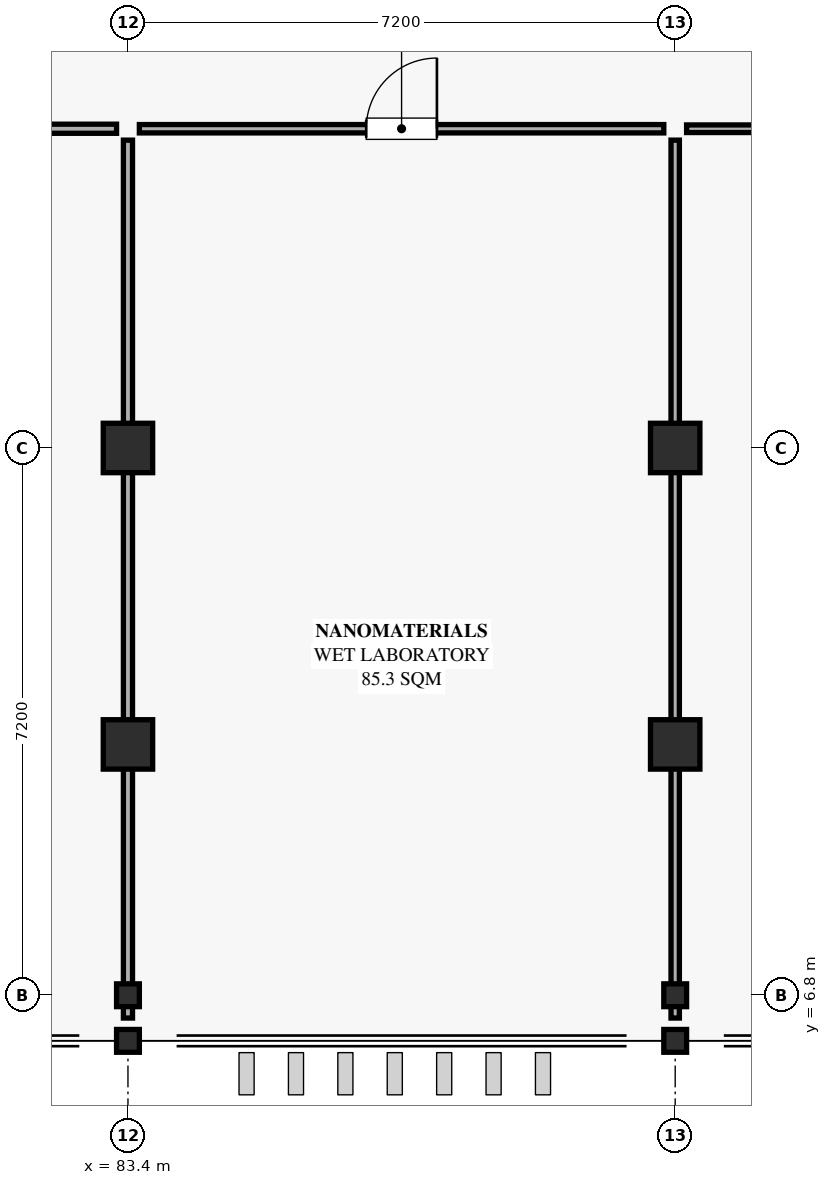
"""IFC4 building model, lengths in metres.
Left out: names, types, materials, properties, quantities, classifications, styles, units other than length and angle.
Written with IfcOpenShell. Run it as: python <this file> out.ifc"""

import sys

from ifc_helpers import new_model, si_unit, direction, frame, frame_2d, origin, origin_2d, place, context, subcontext, project, spatial, rectangle, hollow_rectangle, extrude, element, fill, save


model = new_model("IFC4")
c1 = context("Model", 3, precision=1e-05, world=origin(), true_north=direction((0.0, 1.0)))
c2 = subcontext(c1, "Body", "Model", "MODEL_VIEW")
j1 = project(units=[si_unit("LENGTHUNIT", "METRE"), si_unit("PLANEANGLEUNIT", "RADIAN")], contexts=[c1])
p1 = place(None, origin())
s1 = spatial("IfcSite", under=j1, at=p1, CompositionType="ELEMENT")
p2 = place(p1, origin())
s2 = spatial("IfcBuilding", under=s1, at=p2, CompositionType="ELEMENT")
p3 = place(p2, frame((0.0, 0.0, 33.3)))
s3 = spatial("IfcBuildingStorey", under=s2, at=p3, CompositionType="ELEMENT", Elevation=33.3)
for number, where, z_axis, x_axis in (
    (1, (83.4, 6.2, 0.0), (0.0, 0.0, 1.0), (1.0, 0.0, 0.0)),
    (2, (90.6, 6.2, 0.0), (0.0, 0.0, 1.0), (1.0, 0.0, 0.0)),
    (3, (83.4, 6.8, 0.0), (0.0, 0.0, 1.0), (1.0, 0.0, 0.0)),
    (4, (90.6, 6.8, 0.0), (0.0, 0.0, 1.0), (1.0, 0.0, 0.0)),
):
    element("IfcColumn", number, at=place(p3, frame(where, z_axis=z_axis, x_axis=x_axis)), inside=s3, PredefinedType="COLUMN", context=c2, shape_type="SweptSolid", body=[
        extrude(hollow_rectangle(XDim=0.3, YDim=0.3, WallThickness=0.012, InnerFilletRadius=0.018, OuterFilletRadius=0.03, at=origin_2d()), origin(), (0.0, 0.0, 1.0), 4.32),
    ])
for number, where, z_axis, x_axis in (
    (5, (83.4, 10.1, 0.0), (0.0, 0.0, 1.0), (1.0, 0.0, 0.0)),
    (6, (90.6, 10.1, 0.0), (0.0, 0.0, 1.0), (1.0, 0.0, 0.0)),
    (7, (83.4, 14.0, 0.0), (0.0, 0.0, 1.0), (1.0, 0.0, 0.0)),
    (8, (90.6, 14.0, 0.0), (0.0, 0.0, 1.0), (1.0, 0.0, 0.0)),
):
    element("IfcColumn", number, at=place(p3, frame(where, z_axis=z_axis, x_axis=x_axis)), inside=s3, PredefinedType="COLUMN", context=c2, shape_type="SweptSolid", body=[
        extrude(rectangle(XDim=0.65, YDim=0.65, at=origin_2d()), origin(), (0.0, 0.0, 1.0), 4.32),
    ])
p4 = place(p3, frame((54.95, 18.2, 0.0), z_axis=(0.0, 0.0, 1.0), x_axis=(1.0, 0.0, 0.0)))
e9 = element("IfcWall", 9, at=p4, inside=s3, PredefinedType="PARTITIONING", context=c2, shape_type="SweptSolid", body=[
    extrude(rectangle(XDim=28.3, YDim=0.12, at=frame_2d((14.15, 0.0))), origin(), (0.0, 0.0, 1.0), 2.8),
])
p5 = place(p4, frame((2.8, 0.0, 0.0)))
e10 = element("IfcOpeningElement", 10, at=p5, cuts=e9, PredefinedType="OPENING", context=c2, shape_type="SweptSolid", body=[
    extrude(rectangle(XDim=0.9, YDim=2.22, at=frame_2d((0.45, 1.11))), frame((0.0, 0.07, 0.0), z_axis=(0.0, -1.0, 0.0), x_axis=(1.0, 0.0, 0.0)), (0.0, 0.0, 1.0), 0.14),
])
p6 = place(p3, frame((83.4, 18.05, 0.0), z_axis=(0.0, 0.0, 1.0), x_axis=(0.0, -1.0, 0.0)))
e11 = element("IfcWall", 11, at=p6, inside=s3, PredefinedType="PARTITIONING", context=c2, shape_type="SweptSolid", body=[
    extrude(rectangle(XDim=11.55, YDim=0.12, at=frame_2d((5.775, 0.0))), origin(), (0.0, 0.0, 1.0), 2.8),
])
p7 = place(p3, frame((83.55, 18.2, 0.0), z_axis=(0.0, 0.0, 1.0), x_axis=(1.0, 0.0, 0.0)))
e12 = element("IfcWall", 12, at=p7, inside=s3, PredefinedType="PARTITIONING", context=c2, shape_type="SweptSolid", body=[
    extrude(rectangle(XDim=6.9, YDim=0.11, at=frame_2d((3.45, 0.0))), origin(), (0.0, 0.0, 1.0), 2.8),
])
p8 = place(p7, frame((2.985, 0.0, 0.0)))
e13 = element("IfcOpeningElement", 13, at=p8, cuts=e12, PredefinedType="OPENING", context=c2, shape_type="SweptSolid", body=[
    extrude(rectangle(XDim=0.93, YDim=2.05, at=frame_2d((0.465, 1.025))), frame((0.0, 0.065, 0.0), z_axis=(0.0, -1.0, 0.0), x_axis=(1.0, 0.0, 0.0)), (0.0, 0.0, 1.0), 0.13),
])
p9 = place(p3, frame((90.6, 18.05, 0.0), z_axis=(0.0, 0.0, 1.0), x_axis=(0.0, -1.0, 0.0)))
e14 = element("IfcWall", 14, at=p9, inside=s3, PredefinedType="PARTITIONING", context=c2, shape_type="SweptSolid", body=[
    extrude(rectangle(XDim=11.55, YDim=0.11, at=frame_2d((5.775, 0.0))), origin(), (0.0, 0.0, 1.0), 2.8),
])
p10 = place(p3, frame((90.75, 18.2, 0.0), z_axis=(0.0, 0.0, 1.0), x_axis=(1.0, 0.0, 0.0)))
e15 = element("IfcWall", 15, at=p10, inside=s3, PredefinedType="PARTITIONING", context=c2, shape_type="SweptSolid", body=[
    extrude(rectangle(XDim=28.3, YDim=0.1, at=frame_2d((14.15, 0.0))), origin(), (0.0, 0.0, 1.0), 2.8),
])
p11 = place(p10, frame((24.585, 0.0, 0.0)))
e16 = element("IfcOpeningElement", 16, at=p11, cuts=e15, PredefinedType="OPENING", context=c2, shape_type="SweptSolid", body=[
    extrude(rectangle(XDim=0.93, YDim=2.1, at=frame_2d((0.465, 1.05))), frame((0.0, 0.06, 0.0), z_axis=(0.0, -1.0, 0.0), x_axis=(1.0, 0.0, 0.0)), (0.0, 0.0, 1.0), 0.12),
])
p12 = place(p8, origin())
e17 = element("IfcDoor", 17, at=p12, inside=s3, OperationType="SINGLE_SWING_RIGHT", PredefinedType="DOOR", context=c2, shape_type="SweptSolid", body=[
    extrude(rectangle(XDim=0.93, YDim=2.05, at=frame_2d((0.465, 1.025))), frame((0.0, 0.025, 0.0), z_axis=(0.0, -1.0, 0.0), x_axis=(1.0, 0.0, 0.0)), (0.0, 0.0, 1.0), 0.05),
])
fill(e13, e17)
save(model, sys.argv[1])
